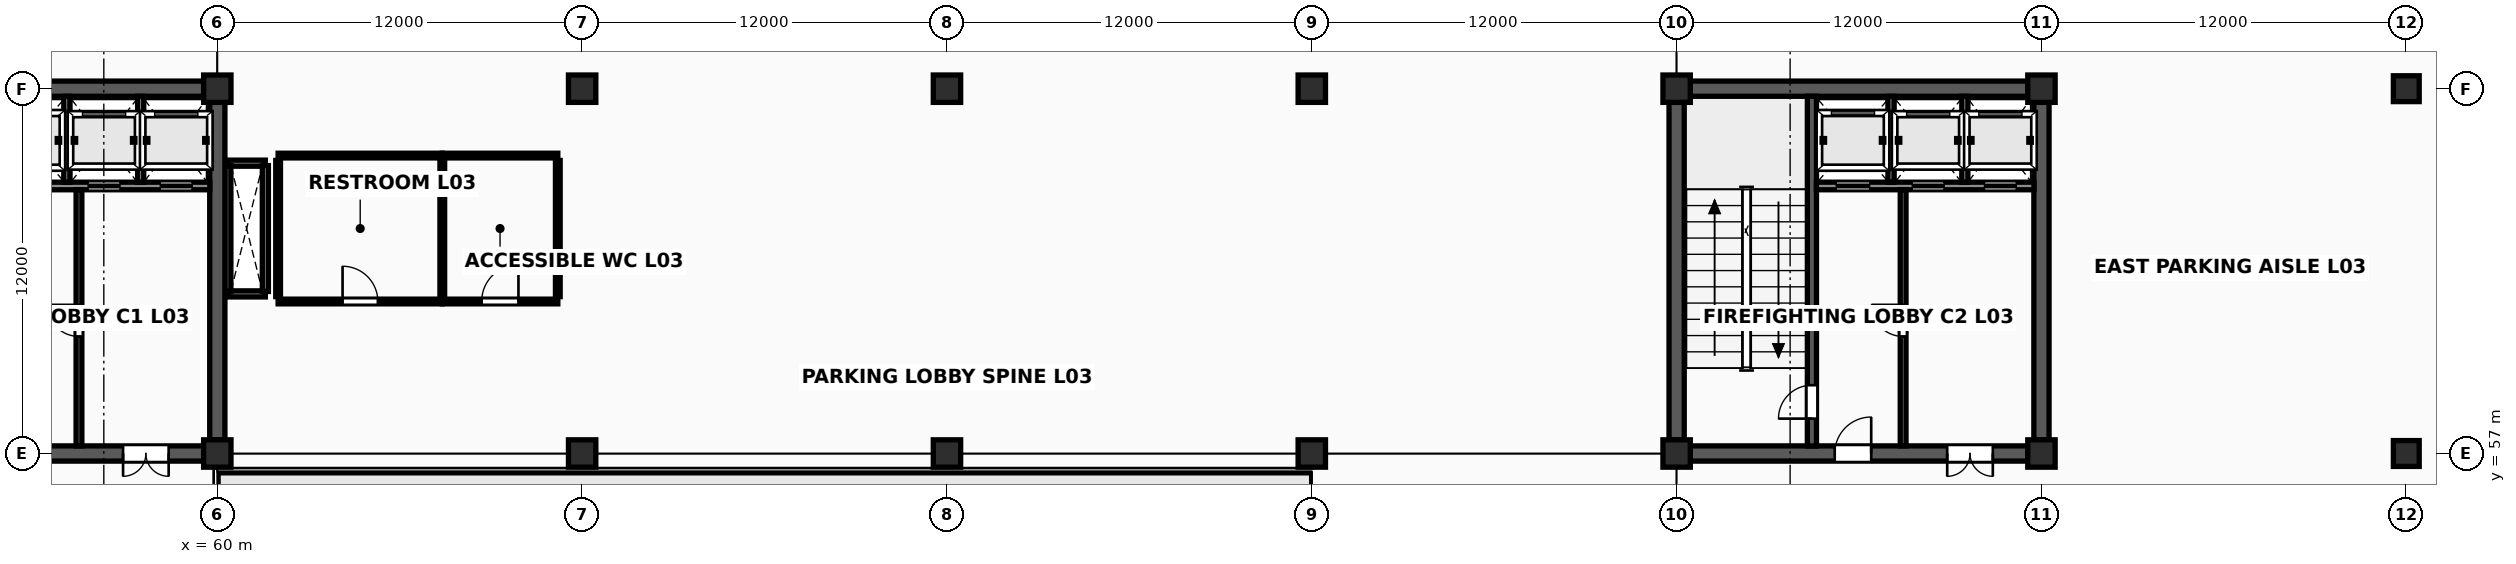
"""IFC4 building model, lengths in metres.
Left out: names, types, materials, properties, quantities, classifications, styles, units other than length and angle.
Written with IfcOpenShell. Run it as: python <this file> out.ifc"""

import sys

from ifc_helpers import new_model, si_unit, direction, frame, frame_2d, origin, origin_2d, place, context, subcontext, project, spatial, rectangle, extrude, element, fill, save


model = new_model("IFC4")
c1 = context("Model", 3, precision=1e-05, world=origin(), true_north=direction((0.0, 1.0)))
c2 = subcontext(c1, "Body", "Model", "MODEL_VIEW")
j1 = project(units=[si_unit("LENGTHUNIT", "METRE"), si_unit("PLANEANGLEUNIT", "RADIAN")], contexts=[c1])
p1 = place(None, origin())
s1 = spatial("IfcSite", under=j1, at=p1, CompositionType="ELEMENT")
p2 = place(p1, origin())
s2 = spatial("IfcBuilding", under=s1, at=p2, CompositionType="ELEMENT")
p3 = place(p2, frame((0.0, 0.0, 13.4)))
s3 = spatial("IfcBuildingStorey", under=s2, at=p3, CompositionType="ELEMENT", Elevation=13.4)
for number, where, z_axis, x_axis in (
    (1, (60.0, 57.0, 0.0), (0.0, 0.0, 1.0), (1.0, 0.0, 0.0)),
    (2, (60.0, 69.0, 0.0), (0.0, 0.0, 1.0), (1.0, 0.0, 0.0)),
    (3, (72.0, 57.0, 0.0), (0.0, 0.0, 1.0), (1.0, 0.0, 0.0)),
    (4, (72.0, 69.0, 0.0), (0.0, 0.0, 1.0), (1.0, 0.0, 0.0)),
    (5, (84.0, 57.0, 0.0), (0.0, 0.0, 1.0), (1.0, 0.0, 0.0)),
    (6, (84.0, 69.0, 0.0), (0.0, 0.0, 1.0), (1.0, 0.0, 0.0)),
    (7, (96.0, 57.0, 0.0), (0.0, 0.0, 1.0), (1.0, 0.0, 0.0)),
    (8, (96.0, 69.0, 0.0), (0.0, 0.0, 1.0), (1.0, 0.0, 0.0)),
    (9, (108.0, 57.0, 0.0), (0.0, 0.0, 1.0), (1.0, 0.0, 0.0)),
    (10, (108.0, 69.0, 0.0), (0.0, 0.0, 1.0), (1.0, 0.0, 0.0)),
    (11, (120.0, 57.0, 0.0), (0.0, 0.0, 1.0), (1.0, 0.0, 0.0)),
    (12, (120.0, 69.0, 0.0), (0.0, 0.0, 1.0), (1.0, 0.0, 0.0)),
):
    element("IfcColumn", number, at=place(p3, frame(where, z_axis=z_axis, x_axis=x_axis)), inside=s3, PredefinedType="COLUMN", context=c2, shape_type="SweptSolid", body=[
        extrude(rectangle(XDim=0.9, YDim=0.9, at=origin_2d()), origin(), (0.0, 0.0, 1.0), 3.8),
    ])
for number, where, z_axis, x_axis in (
    (13, (132.0, 57.0, 0.0), (0.0, 0.0, 1.0), (1.0, 0.0, 0.0)),
    (14, (132.0, 69.0, 0.0), (0.0, 0.0, 1.0), (1.0, 0.0, 0.0)),
):
    element("IfcColumn", number, at=place(p3, frame(where, z_axis=z_axis, x_axis=x_axis)), inside=s3, PredefinedType="COLUMN", context=c2, shape_type="SweptSolid", body=[
        extrude(rectangle(XDim=0.85, YDim=0.85, at=origin_2d()), origin(), (0.0, 0.0, 1.0), 3.8),
    ])
for number, where, z_axis, x_axis in (
    (15, (60.347, 62.25, 0.0), (0.0, 0.0, 1.0), (1.0, 0.0, 0.0)),
    (16, (60.347, 66.55, 0.0), (0.0, 0.0, 1.0), (1.0, 0.0, 0.0)),
):
    element("IfcWall", number, at=place(p3, frame(where, z_axis=z_axis, x_axis=x_axis)), inside=s3, PredefinedType="SOLIDWALL", context=c2, shape_type="SweptSolid", body=[
        extrude(rectangle(XDim=1.233, YDim=0.2, at=frame_2d((0.617, 0.0))), origin(), (0.0, 0.0, 1.0), 3.618),
    ])
for number, where, z_axis, x_axis in (
    (17, (60.347, 62.33, 0.0), (0.0, 0.0, 1.0), (0.0, 1.0, 0.0)),
    (18, (61.58, 62.33, 0.0), (0.0, 0.0, 1.0), (0.0, 1.0, 0.0)),
):
    element("IfcWall", number, at=place(p3, frame(where, z_axis=z_axis, x_axis=x_axis)), inside=s3, PredefinedType="SOLIDWALL", context=c2, shape_type="SweptSolid", body=[
        extrude(rectangle(XDim=4.14, YDim=0.2, at=frame_2d((2.07, 0.0))), origin(), (0.0, 0.0, 1.0), 3.618),
    ])
p4 = place(p3, frame((48.447, 57.0, 0.0), z_axis=(0.0, 0.0, 1.0), x_axis=(1.0, 0.0, 0.0)))
e19 = element("IfcWall", 19, at=p4, inside=s3, PredefinedType="SHEAR", context=c2, shape_type="SweptSolid", body=[
    extrude(rectangle(XDim=11.106, YDim=0.5, at=frame_2d((5.553, 0.0))), origin(), (0.0, 0.0, 1.0), 3.618),
])
p5 = place(p4, frame((4.753, 0.0, 0.0)))
e20 = element("IfcOpeningElement", 20, at=p5, cuts=e19, PredefinedType="OPENING", context=c2, shape_type="SweptSolid", body=[
    extrude(rectangle(XDim=1.2, YDim=2.2, at=frame_2d((0.6, 1.1))), frame((0.0, 0.265, 0.0), z_axis=(0.0, -1.0, 0.0), x_axis=(1.0, 0.0, 0.0)), (0.0, 0.0, 1.0), 0.53),
])
p6 = place(p4, frame((8.453, 0.0, 0.0)))
e21 = element("IfcOpeningElement", 21, at=p6, cuts=e19, PredefinedType="OPENING", context=c2, shape_type="SweptSolid", body=[
    extrude(rectangle(XDim=1.5, YDim=2.25, at=frame_2d((0.75, 1.125))), frame((0.0, 0.265, 0.0), z_axis=(0.0, -1.0, 0.0), x_axis=(1.0, 0.0, 0.0)), (0.0, 0.0, 1.0), 0.53),
])
for number, where, z_axis, x_axis in (
    (22, (48.447, 69.0, 0.0), (0.0, 0.0, 1.0), (1.0, 0.0, 0.0)),
    (23, (60.0, 57.447, 0.0), (0.0, 0.0, 1.0), (0.0, 1.0, 0.0)),
):
    element("IfcWall", number, at=place(p3, frame(where, z_axis=z_axis, x_axis=x_axis)), inside=s3, PredefinedType="SHEAR", context=c2, shape_type="SweptSolid", body=[
        extrude(rectangle(XDim=11.106, YDim=0.5, at=frame_2d((5.553, 0.0))), origin(), (0.0, 0.0, 1.0), 3.618),
    ])
p7 = place(p3, frame((52.597, 65.8, 0.0), z_axis=(0.0, 0.0, 1.0), x_axis=(1.0, 0.0, 0.0)))
e24 = element("IfcWall", 24, at=p7, inside=s3, PredefinedType="SOLIDWALL", context=c2, shape_type="SweptSolid", body=[
    extrude(rectangle(XDim=7.156, YDim=0.25, at=frame_2d((3.578, 0.0))), origin(), (0.0, 0.0, 1.0), 3.618),
])
p8 = place(p7, frame((0.653, 0.0, 0.0)))
e25 = element("IfcOpeningElement", 25, at=p8, cuts=e24, PredefinedType="OPENING", context=c2, shape_type="SweptSolid", body=[
    extrude(rectangle(XDim=1.1, YDim=2.24, at=frame_2d((0.55, 1.12))), frame((0.0, 0.14, 0.0), z_axis=(0.0, -1.0, 0.0), x_axis=(1.0, 0.0, 0.0)), (0.0, 0.0, 1.0), 0.28),
])
p9 = place(p7, frame((3.153, 0.0, 0.0)))
e26 = element("IfcOpeningElement", 26, at=p9, cuts=e24, PredefinedType="OPENING", context=c2, shape_type="SweptSolid", body=[
    extrude(rectangle(XDim=1.05, YDim=2.2, at=frame_2d((0.525, 1.1))), frame((0.0, 0.14, 0.0), z_axis=(0.0, -1.0, 0.0), x_axis=(1.0, 0.0, 0.0)), (0.0, 0.0, 1.0), 0.28),
])
p10 = place(p7, frame((5.528, 0.0, 0.0)))
e27 = element("IfcOpeningElement", 27, at=p10, cuts=e24, PredefinedType="OPENING", context=c2, shape_type="SweptSolid", body=[
    extrude(rectangle(XDim=1.05, YDim=2.2, at=frame_2d((0.525, 1.1))), frame((0.0, 0.14, 0.0), z_axis=(0.0, -1.0, 0.0), x_axis=(1.0, 0.0, 0.0)), (0.0, 0.0, 1.0), 0.28),
])
for number, where, z_axis, x_axis in (
    (28, (55.05, 65.92, 0.0), (0.0, 0.0, 1.0), (0.0, 1.0, 0.0)),
    (29, (57.48, 65.92, 0.0), (0.0, 0.0, 1.0), (0.0, 1.0, 0.0)),
):
    element("IfcWall", number, at=place(p3, frame(where, z_axis=z_axis, x_axis=x_axis)), inside=s3, PredefinedType="SOLIDWALL", context=c2, shape_type="SweptSolid", body=[
        extrude(rectangle(XDim=2.83, YDim=0.2, at=frame_2d((1.415, 0.0))), origin(), (0.0, 0.0, 1.0), 3.608),
    ])
p11 = place(p3, frame((55.45, 57.25, 0.0), z_axis=(0.0, 0.0, 1.0), x_axis=(0.0, 1.0, 0.0)))
e30 = element("IfcWall", 30, at=p11, inside=s3, PredefinedType="SOLIDWALL", context=c2, shape_type="SweptSolid", body=[
    extrude(rectangle(XDim=8.43, YDim=0.19, at=frame_2d((4.215, 0.0))), origin(), (0.0, 0.0, 1.0), 3.608),
])
p12 = place(p11, frame((3.6, 0.0, 0.0)))
e31 = element("IfcOpeningElement", 31, at=p12, cuts=e30, PredefinedType="OPENING", context=c2, shape_type="SweptSolid", body=[
    extrude(rectangle(XDim=1.04, YDim=2.18, at=frame_2d((0.52, 1.09))), frame((0.0, 0.11, 0.0), z_axis=(0.0, -1.0, 0.0), x_axis=(1.0, 0.0, 0.0)), (0.0, 0.0, 1.0), 0.22),
])
p13 = place(p3, frame((108.447, 57.0, 0.0), z_axis=(0.0, 0.0, 1.0), x_axis=(1.0, 0.0, 0.0)))
e32 = element("IfcWall", 32, at=p13, inside=s3, PredefinedType="SHEAR", context=c2, shape_type="SweptSolid", body=[
    extrude(rectangle(XDim=11.106, YDim=0.5, at=frame_2d((5.553, 0.0))), origin(), (0.0, 0.0, 1.0), 3.618),
])
p14 = place(p13, frame((4.753, 0.0, 0.0)))
e33 = element("IfcOpeningElement", 33, at=p14, cuts=e32, PredefinedType="OPENING", context=c2, shape_type="SweptSolid", body=[
    extrude(rectangle(XDim=1.2, YDim=2.2, at=frame_2d((0.6, 1.1))), frame((0.0, 0.265, 0.0), z_axis=(0.0, -1.0, 0.0), x_axis=(1.0, 0.0, 0.0)), (0.0, 0.0, 1.0), 0.53),
])
p15 = place(p13, frame((8.453, 0.0, 0.0)))
e34 = element("IfcOpeningElement", 34, at=p15, cuts=e32, PredefinedType="OPENING", context=c2, shape_type="SweptSolid", body=[
    extrude(rectangle(XDim=1.5, YDim=2.25, at=frame_2d((0.75, 1.125))), frame((0.0, 0.265, 0.0), z_axis=(0.0, -1.0, 0.0), x_axis=(1.0, 0.0, 0.0)), (0.0, 0.0, 1.0), 0.53),
])
for number, where, z_axis, x_axis in (
    (35, (108.447, 69.0, 0.0), (0.0, 0.0, 1.0), (1.0, 0.0, 0.0)),
    (36, (108.0, 57.447, 0.0), (0.0, 0.0, 1.0), (0.0, 1.0, 0.0)),
    (37, (120.0, 57.447, 0.0), (0.0, 0.0, 1.0), (0.0, 1.0, 0.0)),
):
    element("IfcWall", number, at=place(p3, frame(where, z_axis=z_axis, x_axis=x_axis)), inside=s3, PredefinedType="SHEAR", context=c2, shape_type="SweptSolid", body=[
        extrude(rectangle(XDim=11.106, YDim=0.5, at=frame_2d((5.553, 0.0))), origin(), (0.0, 0.0, 1.0), 3.618),
    ])
p16 = place(p3, frame((112.45, 57.247, 0.0), z_axis=(0.0, 0.0, 1.0), x_axis=(0.0, 1.0, 0.0)))
e38 = element("IfcWall", 38, at=p16, inside=s3, PredefinedType="SHEAR", context=c2, shape_type="SweptSolid", body=[
    extrude(rectangle(XDim=11.506, YDim=0.3, at=frame_2d((5.753, 0.0))), origin(), (0.0, 0.0, 1.0), 3.618),
])
p17 = place(p16, frame((0.9, 0.0, 0.0)))
e39 = element("IfcOpeningElement", 39, at=p17, cuts=e38, PredefinedType="OPENING", context=c2, shape_type="SweptSolid", body=[
    extrude(rectangle(XDim=1.1, YDim=2.2, at=frame_2d((0.55, 1.1))), frame((0.0, 0.165, 0.0), z_axis=(0.0, -1.0, 0.0), x_axis=(1.0, 0.0, 0.0)), (0.0, 0.0, 1.0), 0.33),
])
p18 = place(p3, frame((112.597, 65.8, 0.0), z_axis=(0.0, 0.0, 1.0), x_axis=(1.0, 0.0, 0.0)))
e40 = element("IfcWall", 40, at=p18, inside=s3, PredefinedType="SOLIDWALL", context=c2, shape_type="SweptSolid", body=[
    extrude(rectangle(XDim=7.156, YDim=0.25, at=frame_2d((3.578, 0.0))), origin(), (0.0, 0.0, 1.0), 3.618),
])
p19 = place(p18, frame((0.653, 0.0, 0.0)))
e41 = element("IfcOpeningElement", 41, at=p19, cuts=e40, PredefinedType="OPENING", context=c2, shape_type="SweptSolid", body=[
    extrude(rectangle(XDim=1.1, YDim=2.24, at=frame_2d((0.55, 1.12))), frame((0.0, 0.14, 0.0), z_axis=(0.0, -1.0, 0.0), x_axis=(1.0, 0.0, 0.0)), (0.0, 0.0, 1.0), 0.28),
])
p20 = place(p18, frame((3.153, 0.0, 0.0)))
e42 = element("IfcOpeningElement", 42, at=p20, cuts=e40, PredefinedType="OPENING", context=c2, shape_type="SweptSolid", body=[
    extrude(rectangle(XDim=1.05, YDim=2.2, at=frame_2d((0.525, 1.1))), frame((0.0, 0.14, 0.0), z_axis=(0.0, -1.0, 0.0), x_axis=(1.0, 0.0, 0.0)), (0.0, 0.0, 1.0), 0.28),
])
p21 = place(p18, frame((5.528, 0.0, 0.0)))
e43 = element("IfcOpeningElement", 43, at=p21, cuts=e40, PredefinedType="OPENING", context=c2, shape_type="SweptSolid", body=[
    extrude(rectangle(XDim=1.05, YDim=2.2, at=frame_2d((0.525, 1.1))), frame((0.0, 0.14, 0.0), z_axis=(0.0, -1.0, 0.0), x_axis=(1.0, 0.0, 0.0)), (0.0, 0.0, 1.0), 0.28),
])
for number, where, z_axis, x_axis in (
    (44, (115.05, 65.92, 0.0), (0.0, 0.0, 1.0), (0.0, 1.0, 0.0)),
    (45, (117.48, 65.92, 0.0), (0.0, 0.0, 1.0), (0.0, 1.0, 0.0)),
):
    element("IfcWall", number, at=place(p3, frame(where, z_axis=z_axis, x_axis=x_axis)), inside=s3, PredefinedType="SOLIDWALL", context=c2, shape_type="SweptSolid", body=[
        extrude(rectangle(XDim=2.83, YDim=0.2, at=frame_2d((1.415, 0.0))), origin(), (0.0, 0.0, 1.0), 3.608),
    ])
p22 = place(p3, frame((115.45, 57.25, 0.0), z_axis=(0.0, 0.0, 1.0), x_axis=(0.0, 1.0, 0.0)))
e46 = element("IfcWall", 46, at=p22, inside=s3, PredefinedType="SOLIDWALL", context=c2, shape_type="SweptSolid", body=[
    extrude(rectangle(XDim=8.43, YDim=0.19, at=frame_2d((4.215, 0.0))), origin(), (0.0, 0.0, 1.0), 3.608),
])
p23 = place(p22, frame((3.6, 0.0, 0.0)))
e47 = element("IfcOpeningElement", 47, at=p23, cuts=e46, PredefinedType="OPENING", context=c2, shape_type="SweptSolid", body=[
    extrude(rectangle(XDim=1.04, YDim=2.18, at=frame_2d((0.52, 1.09))), frame((0.0, 0.11, 0.0), z_axis=(0.0, -1.0, 0.0), x_axis=(1.0, 0.0, 0.0)), (0.0, 0.0, 1.0), 0.22),
])
p24 = place(p3, frame((62.0, 62.0, 0.0), z_axis=(0.0, 0.0, 1.0), x_axis=(1.0, 0.0, 0.0)))
e48 = element("IfcWall", 48, at=p24, inside=s3, PredefinedType="PLUMBINGWALL", context=c2, shape_type="SweptSolid", body=[
    extrude(rectangle(XDim=5.4, YDim=0.155, at=frame_2d((2.7, 0.0))), origin(), (0.0, 0.0, 1.0), 2.75),
])
p25 = place(p24, frame((2.12, 0.0, 0.0)))
e49 = element("IfcOpeningElement", 49, at=p25, cuts=e48, PredefinedType="OPENING", context=c2, shape_type="SweptSolid", body=[
    extrude(rectangle(XDim=1.16, YDim=2.23, at=frame_2d((0.58, 1.115))), frame((0.0, 0.093, 0.0), z_axis=(0.0, -1.0, 0.0), x_axis=(1.0, 0.0, 0.0)), (0.0, 0.0, 1.0), 0.185),
])
p26 = place(p3, frame((62.0, 66.8, 0.0), z_axis=(0.0, 0.0, 1.0), x_axis=(1.0, 0.0, 0.0)))
e50 = element("IfcWall", 50, at=p26, inside=s3, PredefinedType="PLUMBINGWALL", context=c2, shape_type="SweptSolid", body=[
    extrude(rectangle(XDim=5.4, YDim=0.155, at=frame_2d((2.7, 0.0))), origin(), (0.0, 0.0, 1.0), 2.75),
])
for number, where, z_axis, x_axis in (
    (51, (62.0, 62.16, 0.0), (0.0, 0.0, 1.0), (0.0, 1.0, 0.0)),
    (52, (67.4, 62.16, 0.0), (0.0, 0.0, 1.0), (0.0, 1.0, 0.0)),
):
    element("IfcWall", number, at=place(p3, frame(where, z_axis=z_axis, x_axis=x_axis)), inside=s3, PredefinedType="PLUMBINGWALL", context=c2, shape_type="SweptSolid", body=[
        extrude(rectangle(XDim=4.48, YDim=0.155, at=frame_2d((2.24, 0.0))), origin(), (0.0, 0.0, 1.0), 2.75),
    ])
p27 = place(p3, frame((67.4, 62.0, 0.0), z_axis=(0.0, 0.0, 1.0), x_axis=(1.0, 0.0, 0.0)))
e53 = element("IfcWall", 53, at=p27, inside=s3, PredefinedType="PLUMBINGWALL", context=c2, shape_type="SweptSolid", body=[
    extrude(rectangle(XDim=3.8, YDim=0.155, at=frame_2d((1.9, 0.0))), origin(), (0.0, 0.0, 1.0), 2.75),
])
p28 = place(p27, frame((1.295, 0.0, 0.0)))
e54 = element("IfcOpeningElement", 54, at=p28, cuts=e53, PredefinedType="OPENING", context=c2, shape_type="SweptSolid", body=[
    extrude(rectangle(XDim=1.21, YDim=2.25, at=frame_2d((0.605, 1.125))), frame((0.0, 0.093, 0.0), z_axis=(0.0, -1.0, 0.0), x_axis=(1.0, 0.0, 0.0)), (0.0, 0.0, 1.0), 0.185),
])
p29 = place(p3, frame((67.4, 66.8, 0.0), z_axis=(0.0, 0.0, 1.0), x_axis=(1.0, 0.0, 0.0)))
e55 = element("IfcWall", 55, at=p29, inside=s3, PredefinedType="PLUMBINGWALL", context=c2, shape_type="SweptSolid", body=[
    extrude(rectangle(XDim=3.8, YDim=0.155, at=frame_2d((1.9, 0.0))), origin(), (0.0, 0.0, 1.0), 2.75),
])
p30 = place(p3, frame((71.2, 62.16, 0.0), z_axis=(0.0, 0.0, 1.0), x_axis=(0.0, 1.0, 0.0)))
e56 = element("IfcWall", 56, at=p30, inside=s3, PredefinedType="PLUMBINGWALL", context=c2, shape_type="SweptSolid", body=[
    extrude(rectangle(XDim=4.48, YDim=0.155, at=frame_2d((2.24, 0.0))), origin(), (0.0, 0.0, 1.0), 2.75),
])
p31 = place(p12, origin())
e57 = element("IfcDoor", 57, at=p31, inside=s3, OperationType="SINGLE_SWING_RIGHT", PredefinedType="DOOR", context=c2, shape_type="SweptSolid", body=[
    extrude(rectangle(XDim=1.04, YDim=2.18, at=frame_2d((0.52, 1.09))), frame((0.0, 0.025, 0.0), z_axis=(0.0, -1.0, 0.0), x_axis=(1.0, 0.0, 0.0)), (0.0, 0.0, 1.0), 0.05),
])
fill(e31, e57)
p32 = place(p6, origin())
e58 = element("IfcDoor", 58, at=p32, inside=s3, OperationType="DOUBLE_DOOR_SINGLE_SWING", PredefinedType="DOOR", context=c2, shape_type="SweptSolid", body=[
    extrude(rectangle(XDim=1.5, YDim=2.25, at=frame_2d((0.75, 1.125))), frame((0.0, 0.025, 0.0), z_axis=(0.0, -1.0, 0.0), x_axis=(1.0, 0.0, 0.0)), (0.0, 0.0, 1.0), 0.05),
])
fill(e21, e58)
p33 = place(p9, origin())
e59 = element("IfcDoor", 59, at=p33, inside=s3, OperationType="SLIDING_TO_LEFT", PredefinedType="USERDEFINED", context=c2, shape_type="SweptSolid", body=[
    extrude(rectangle(XDim=1.05, YDim=2.2, at=frame_2d((0.525, 1.1))), frame((0.0, 0.025, 0.0), z_axis=(0.0, -1.0, 0.0), x_axis=(1.0, 0.0, 0.0)), (0.0, 0.0, 1.0), 0.05),
])
fill(e26, e59)
p34 = place(p10, origin())
e60 = element("IfcDoor", 60, at=p34, inside=s3, OperationType="SLIDING_TO_LEFT", PredefinedType="USERDEFINED", context=c2, shape_type="SweptSolid", body=[
    extrude(rectangle(XDim=1.05, YDim=2.2, at=frame_2d((0.525, 1.1))), frame((0.0, 0.025, 0.0), z_axis=(0.0, -1.0, 0.0), x_axis=(1.0, 0.0, 0.0)), (0.0, 0.0, 1.0), 0.05),
])
fill(e27, e60)
p35 = place(p17, origin())
e61 = element("IfcDoor", 61, at=p35, inside=s3, OperationType="SINGLE_SWING_LEFT", PredefinedType="DOOR", context=c2, shape_type="SweptSolid", body=[
    extrude(rectangle(XDim=1.1, YDim=2.2, at=frame_2d((0.55, 1.1))), frame((0.0, 0.025, 0.0), z_axis=(0.0, -1.0, 0.0), x_axis=(1.0, 0.0, 0.0)), (0.0, 0.0, 1.0), 0.05),
])
fill(e39, e61)
p36 = place(p23, origin())
e62 = element("IfcDoor", 62, at=p36, inside=s3, OperationType="SINGLE_SWING_RIGHT", PredefinedType="DOOR", context=c2, shape_type="SweptSolid", body=[
    extrude(rectangle(XDim=1.04, YDim=2.18, at=frame_2d((0.52, 1.09))), frame((0.0, 0.025, 0.0), z_axis=(0.0, -1.0, 0.0), x_axis=(1.0, 0.0, 0.0)), (0.0, 0.0, 1.0), 0.05),
])
fill(e47, e62)
p37 = place(p14, origin())
e63 = element("IfcDoor", 63, at=p37, inside=s3, OperationType="SINGLE_SWING_RIGHT", PredefinedType="DOOR", context=c2, shape_type="SweptSolid", body=[
    extrude(rectangle(XDim=1.2, YDim=2.2, at=frame_2d((0.6, 1.1))), frame((0.0, 0.025, 0.0), z_axis=(0.0, -1.0, 0.0), x_axis=(1.0, 0.0, 0.0)), (0.0, 0.0, 1.0), 0.05),
])
fill(e33, e63)
p38 = place(p15, origin())
e64 = element("IfcDoor", 64, at=p38, inside=s3, OperationType="DOUBLE_DOOR_SINGLE_SWING", PredefinedType="DOOR", context=c2, shape_type="SweptSolid", body=[
    extrude(rectangle(XDim=1.5, YDim=2.25, at=frame_2d((0.75, 1.125))), frame((0.0, 0.025, 0.0), z_axis=(0.0, -1.0, 0.0), x_axis=(1.0, 0.0, 0.0)), (0.0, 0.0, 1.0), 0.05),
])
fill(e34, e64)
p39 = place(p19, origin())
e65 = element("IfcDoor", 65, at=p39, inside=s3, OperationType="SLIDING_TO_LEFT", PredefinedType="USERDEFINED", context=c2, shape_type="SweptSolid", body=[
    extrude(rectangle(XDim=1.1, YDim=2.24, at=frame_2d((0.55, 1.12))), frame((0.0, 0.025, 0.0), z_axis=(0.0, -1.0, 0.0), x_axis=(1.0, 0.0, 0.0)), (0.0, 0.0, 1.0), 0.05),
])
fill(e41, e65)
p40 = place(p20, origin())
e66 = element("IfcDoor", 66, at=p40, inside=s3, OperationType="SLIDING_TO_LEFT", PredefinedType="USERDEFINED", context=c2, shape_type="SweptSolid", body=[
    extrude(rectangle(XDim=1.05, YDim=2.2, at=frame_2d((0.525, 1.1))), frame((0.0, 0.025, 0.0), z_axis=(0.0, -1.0, 0.0), x_axis=(1.0, 0.0, 0.0)), (0.0, 0.0, 1.0), 0.05),
])
fill(e42, e66)
p41 = place(p21, origin())
e67 = element("IfcDoor", 67, at=p41, inside=s3, OperationType="SLIDING_TO_LEFT", PredefinedType="USERDEFINED", context=c2, shape_type="SweptSolid", body=[
    extrude(rectangle(XDim=1.05, YDim=2.2, at=frame_2d((0.525, 1.1))), frame((0.0, 0.025, 0.0), z_axis=(0.0, -1.0, 0.0), x_axis=(1.0, 0.0, 0.0)), (0.0, 0.0, 1.0), 0.05),
])
fill(e43, e67)
p42 = place(p25, origin())
e68 = element("IfcDoor", 68, at=p42, inside=s3, OperationType="SINGLE_SWING_LEFT", PredefinedType="DOOR", context=c2, shape_type="SweptSolid", body=[
    extrude(rectangle(XDim=1.16, YDim=2.23, at=frame_2d((0.58, 1.115))), frame((0.0, 0.025, 0.0), z_axis=(0.0, -1.0, 0.0), x_axis=(1.0, 0.0, 0.0)), (0.0, 0.0, 1.0), 0.05),
])
fill(e49, e68)
p43 = place(p28, origin())
e69 = element("IfcDoor", 69, at=p43, inside=s3, OperationType="SINGLE_SWING_RIGHT", PredefinedType="DOOR", context=c2, shape_type="SweptSolid", body=[
    extrude(rectangle(XDim=1.21, YDim=2.25, at=frame_2d((0.605, 1.125))), frame((0.0, 0.025, 0.0), z_axis=(0.0, -1.0, 0.0), x_axis=(1.0, 0.0, 0.0)), (0.0, 0.0, 1.0), 0.05),
])
fill(e54, e69)
save(model, sys.argv[1])
